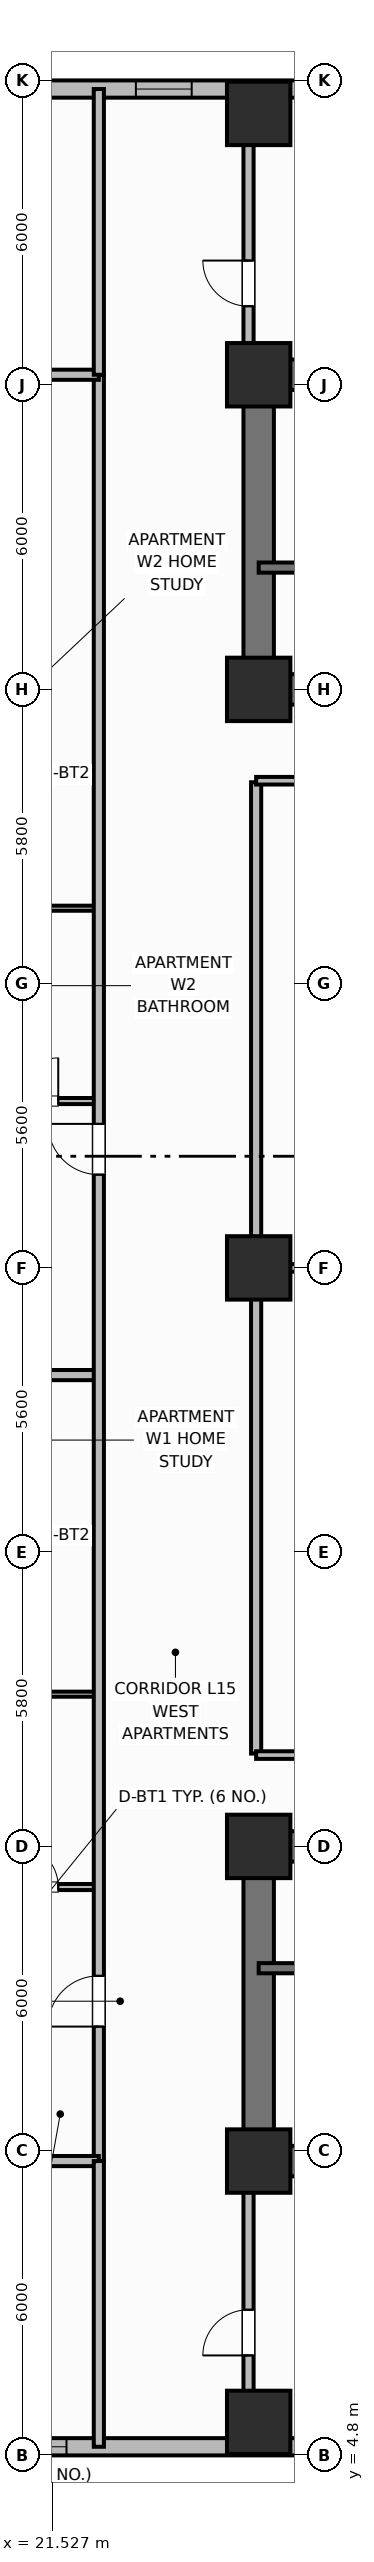
"""IFC4 building model, lengths in metres.
Left out: names, types, materials, properties, quantities, classifications, styles, units other than length and angle.
Written with IfcOpenShell. Run it as: python <this file> out.ifc"""

import sys

from ifc_helpers import new_model, si_unit, direction, frame, frame_2d, origin, origin_2d, place, context, subcontext, project, spatial, rectangle, extrude, element, fill, save


model = new_model("IFC4")
c1 = context("Model", 3, precision=1e-05, world=origin(), true_north=direction((0.0, 1.0)))
c2 = subcontext(c1, "Body", "Model", "MODEL_VIEW")
j1 = project(units=[si_unit("LENGTHUNIT", "METRE"), si_unit("PLANEANGLEUNIT", "RADIAN")], contexts=[c1])
p1 = place(None, origin())
s1 = spatial("IfcSite", under=j1, at=p1, CompositionType="ELEMENT")
p2 = place(p1, origin())
s2 = spatial("IfcBuilding", under=s1, at=p2, CompositionType="ELEMENT")
p3 = place(p2, frame((0.0, 0.0, 62.1)))
s3 = spatial("IfcBuildingStorey", under=s2, at=p3, CompositionType="ELEMENT", Elevation=62.1)
p4 = place(p3, frame((52.8, 10.6, 0.0), z_axis=(0.0, 0.0, 1.0), x_axis=(-1.0, 0.0, 0.0)))
e1 = element("IfcWall", 1, at=p4, inside=s3, PredefinedType="SHEAR", context=c2, shape_type="SweptSolid", body=[
    extrude(rectangle(XDim=27.2, YDim=0.6, at=frame_2d((13.6, 0.0))), origin(), (0.0, 0.0, 1.0), 3.7),
])
p5 = place(p3, frame((25.6, 10.9, 0.0), z_axis=(0.0, 0.0, 1.0), x_axis=(0.0, 1.0, 0.0)))
e2 = element("IfcWall", 2, at=p5, inside=s3, PredefinedType="SHEAR", context=c2, shape_type="SweptSolid", body=[
    extrude(rectangle(XDim=5.6, YDim=0.6, at=frame_2d((2.8, 0.0))), origin(), (0.0, 0.0, 1.0), 3.7),
])
p6 = place(p3, frame((25.6, 16.8, 0.0), z_axis=(0.0, 0.0, 1.0), x_axis=(1.0, 0.0, 0.0)))
e3 = element("IfcWall", 3, at=p6, inside=s3, PredefinedType="SHEAR", context=c2, shape_type="SweptSolid", body=[
    extrude(rectangle(XDim=27.2, YDim=0.6, at=frame_2d((13.6, 0.0))), origin(), (0.0, 0.0, 1.0), 3.7),
])
p7 = place(p6, frame((1.9, 0.0, 0.0)))
e4 = element("IfcOpeningElement", 4, at=p7, cuts=e3, PredefinedType="OPENING", context=c2, shape_type="SweptSolid", body=[
    extrude(rectangle(XDim=1.1, YDim=2.15, at=frame_2d((0.55, 1.075))), frame((0.0, 0.31, 0.0), z_axis=(0.0, -1.0, 0.0), x_axis=(1.0, 0.0, 0.0)), (0.0, 0.0, 1.0), 0.62),
])
p8 = place(p6, frame((13.0, 0.0, 0.0)))
e5 = element("IfcOpeningElement", 5, at=p8, cuts=e3, PredefinedType="OPENING", context=c2, shape_type="SweptSolid", body=[
    extrude(rectangle(XDim=1.2, YDim=2.15, at=frame_2d((0.6, 1.075))), frame((0.0, 0.31, 0.0), z_axis=(0.0, -1.0, 0.0), x_axis=(1.0, 0.0, 0.0)), (0.0, 0.0, 1.0), 0.62),
])
p9 = place(p6, frame((20.4, 0.0, 0.0)))
e6 = element("IfcOpeningElement", 6, at=p9, cuts=e3, PredefinedType="OPENING", context=c2, shape_type="SweptSolid", body=[
    extrude(rectangle(XDim=1.3, YDim=2.2, at=frame_2d((0.65, 1.1))), frame((0.0, 0.31, 0.0), z_axis=(0.0, -1.0, 0.0), x_axis=(1.0, 0.0, 0.0)), (0.0, 0.0, 1.0), 0.62),
])
p10 = place(p6, frame((24.65, 0.0, 0.0)))
e7 = element("IfcOpeningElement", 7, at=p10, cuts=e3, PredefinedType="OPENING", context=c2, shape_type="SweptSolid", body=[
    extrude(rectangle(XDim=0.85, YDim=2.1, at=frame_2d((0.425, 1.05))), frame((0.0, 0.31, 0.0), z_axis=(0.0, -1.0, 0.0), x_axis=(1.0, 0.0, 0.0)), (0.0, 0.0, 1.0), 0.62),
])
p11 = place(p3, frame((25.6, 45.8, 0.0), z_axis=(0.0, 0.0, 1.0), x_axis=(1.0, 0.0, 0.0)))
e8 = element("IfcWall", 8, at=p11, inside=s3, PredefinedType="SHEAR", context=c2, shape_type="SweptSolid", body=[
    extrude(rectangle(XDim=27.2, YDim=0.6, at=frame_2d((13.6, 0.0))), origin(), (0.0, 0.0, 1.0), 3.7),
])
p12 = place(p3, frame((25.6, 39.9, 0.0), z_axis=(0.0, 0.0, 1.0), x_axis=(0.0, 1.0, 0.0)))
e9 = element("IfcWall", 9, at=p12, inside=s3, PredefinedType="SHEAR", context=c2, shape_type="SweptSolid", body=[
    extrude(rectangle(XDim=5.6, YDim=0.6, at=frame_2d((2.8, 0.0))), origin(), (0.0, 0.0, 1.0), 3.7),
])
p13 = place(p3, frame((52.8, 39.6, 0.0), z_axis=(0.0, 0.0, 1.0), x_axis=(-1.0, 0.0, 0.0)))
e10 = element("IfcWall", 10, at=p13, inside=s3, PredefinedType="SHEAR", context=c2, shape_type="SweptSolid", body=[
    extrude(rectangle(XDim=27.2, YDim=0.6, at=frame_2d((13.6, 0.0))), origin(), (0.0, 0.0, 1.0), 3.7),
])
p14 = place(p13, frame((24.2, 0.0, 0.0)))
e11 = element("IfcOpeningElement", 11, at=p14, cuts=e10, PredefinedType="OPENING", context=c2, shape_type="SweptSolid", body=[
    extrude(rectangle(XDim=1.1, YDim=2.15, at=frame_2d((0.55, 1.075))), frame((0.0, 0.31, 0.0), z_axis=(0.0, -1.0, 0.0), x_axis=(1.0, 0.0, 0.0)), (0.0, 0.0, 1.0), 0.62),
])
p15 = place(p13, frame((15.1, 0.0, 0.0)))
e12 = element("IfcOpeningElement", 12, at=p15, cuts=e10, PredefinedType="OPENING", context=c2, shape_type="SweptSolid", body=[
    extrude(rectangle(XDim=1.2, YDim=2.15, at=frame_2d((0.6, 1.075))), frame((0.0, 0.31, 0.0), z_axis=(0.0, -1.0, 0.0), x_axis=(1.0, 0.0, 0.0)), (0.0, 0.0, 1.0), 0.62),
])
p16 = place(p13, frame((11.6, 0.0, 0.0)))
e13 = element("IfcOpeningElement", 13, at=p16, cuts=e10, PredefinedType="OPENING", context=c2, shape_type="SweptSolid", body=[
    extrude(rectangle(XDim=0.9, YDim=2.1, at=frame_2d((0.45, 1.05))), frame((0.0, 0.31, 0.0), z_axis=(0.0, -1.0, 0.0), x_axis=(1.0, 0.0, 0.0)), (0.0, 0.0, 1.0), 0.62),
])
p17 = place(p13, frame((3.6, 0.0, 0.0)))
e14 = element("IfcOpeningElement", 14, at=p17, cuts=e10, PredefinedType="OPENING", context=c2, shape_type="SweptSolid", body=[
    extrude(rectangle(XDim=1.0, YDim=2.15, at=frame_2d((0.5, 1.075))), frame((0.0, 0.31, 0.0), z_axis=(0.0, -1.0, 0.0), x_axis=(1.0, 0.0, 0.0)), (0.0, 0.0, 1.0), 0.62),
])
for number, where, z_axis, x_axis in (
    (15, (25.6, 10.6, 0.0), (0.0, 0.0, 1.0), (1.0, 0.0, 0.0)),
    (16, (25.6, 16.8, 0.0), (0.0, 0.0, 1.0), (1.0, 0.0, 0.0)),
    (17, (25.6, 39.6, 0.0), (0.0, 0.0, 1.0), (1.0, 0.0, 0.0)),
    (18, (25.6, 45.8, 0.0), (0.0, 0.0, 1.0), (1.0, 0.0, 0.0)),
    (19, (25.6, 28.2, 0.0), (0.0, 0.0, 1.0), (1.0, 0.0, 0.0)),
    (20, (25.6, 5.45, 0.0), (0.0, 0.0, 1.0), (1.0, 0.0, 0.0)),
    (21, (25.6, 50.95, 0.0), (0.0, 0.0, 1.0), (1.0, 0.0, 0.0)),
):
    element("IfcColumn", number, at=place(p3, frame(where, z_axis=z_axis, x_axis=x_axis)), inside=s3, PredefinedType="COLUMN", context=c2, shape_type="SweptSolid", body=[
        extrude(rectangle(XDim=1.25, YDim=1.25, at=origin_2d()), origin(), (0.0, 0.0, 1.0), 3.7),
    ])
p18 = place(p3, frame((18.6, 4.97, 0.0), z_axis=(0.0, 0.0, 1.0), x_axis=(1.0, 0.0, 0.0)))
e22 = element("IfcWall", 22, at=p18, inside=s3, PredefinedType="SOLIDWALL", context=c2, shape_type="SweptSolid", body=[
    extrude(rectangle(XDim=17.4, YDim=0.34, at=frame_2d((8.7, 0.0))), origin(), (0.0, 0.0, 1.0), 2.7),
])
p19 = place(p18, frame((1.413, 0.0, 0.73)))
e23 = element("IfcOpeningElement", 23, at=p19, cuts=e22, PredefinedType="OPENING", context=c2, shape_type="SweptSolid", body=[
    extrude(rectangle(XDim=1.8, YDim=1.85, at=frame_2d((0.9, 0.925))), frame((0.0, 0.18, 0.0), z_axis=(0.0, -1.0, 0.0), x_axis=(1.0, 0.0, 0.0)), (0.0, 0.0, 1.0), 0.36),
])
p20 = place(p18, frame((9.812, 0.0, 0.73)))
e24 = element("IfcOpeningElement", 24, at=p20, cuts=e22, PredefinedType="OPENING", context=c2, shape_type="SweptSolid", body=[
    extrude(rectangle(XDim=1.8, YDim=1.85, at=frame_2d((0.9, 0.925))), frame((0.0, 0.18, 0.0), z_axis=(0.0, -1.0, 0.0), x_axis=(1.0, 0.0, 0.0)), (0.0, 0.0, 1.0), 0.36),
])
p21 = place(p18, frame((13.488, 0.0, 0.73)))
e25 = element("IfcOpeningElement", 25, at=p21, cuts=e22, PredefinedType="OPENING", context=c2, shape_type="SweptSolid", body=[
    extrude(rectangle(XDim=1.8, YDim=1.85, at=frame_2d((0.9, 0.925))), frame((0.0, 0.18, 0.0), z_axis=(0.0, -1.0, 0.0), x_axis=(1.0, 0.0, 0.0)), (0.0, 0.0, 1.0), 0.36),
])
p22 = place(p3, frame((36.0, 51.43, 0.0), z_axis=(0.0, 0.0, 1.0), x_axis=(-1.0, 0.0, 0.0)))
e26 = element("IfcWall", 26, at=p22, inside=s3, PredefinedType="SOLIDWALL", context=c2, shape_type="SweptSolid", body=[
    extrude(rectangle(XDim=17.4, YDim=0.34, at=frame_2d((8.7, 0.0))), origin(), (0.0, 0.0, 1.0), 2.7),
])
p23 = place(p22, frame((2.06, 0.0, 0.93)))
e27 = element("IfcOpeningElement", 27, at=p23, cuts=e26, PredefinedType="OPENING", context=c2, shape_type="SweptSolid", body=[
    extrude(rectangle(XDim=1.1, YDim=1.65, at=frame_2d((0.55, 0.825))), frame((0.0, 0.18, 0.0), z_axis=(0.0, -1.0, 0.0), x_axis=(1.0, 0.0, 0.0)), (0.0, 0.0, 1.0), 0.36),
])
p24 = place(p22, frame((4.93, 0.0, 0.93)))
e28 = element("IfcOpeningElement", 28, at=p24, cuts=e26, PredefinedType="OPENING", context=c2, shape_type="SweptSolid", body=[
    extrude(rectangle(XDim=1.1, YDim=1.65, at=frame_2d((0.55, 0.825))), frame((0.0, 0.18, 0.0), z_axis=(0.0, -1.0, 0.0), x_axis=(1.0, 0.0, 0.0)), (0.0, 0.0, 1.0), 0.36),
])
p25 = place(p22, frame((7.8, 0.0, 0.93)))
e29 = element("IfcOpeningElement", 29, at=p25, cuts=e26, PredefinedType="OPENING", context=c2, shape_type="SweptSolid", body=[
    extrude(rectangle(XDim=1.1, YDim=1.65, at=frame_2d((0.55, 0.825))), frame((0.0, 0.18, 0.0), z_axis=(0.0, -1.0, 0.0), x_axis=(1.0, 0.0, 0.0)), (0.0, 0.0, 1.0), 0.36),
])
p26 = place(p22, frame((11.72, 0.0, 0.93)))
e30 = element("IfcOpeningElement", 30, at=p26, cuts=e26, PredefinedType="OPENING", context=c2, shape_type="SweptSolid", body=[
    extrude(rectangle(XDim=1.1, YDim=1.65, at=frame_2d((0.55, 0.825))), frame((0.0, 0.18, 0.0), z_axis=(0.0, -1.0, 0.0), x_axis=(1.0, 0.0, 0.0)), (0.0, 0.0, 1.0), 0.36),
])
p27 = place(p22, frame((14.59, 0.0, 0.93)))
e31 = element("IfcOpeningElement", 31, at=p27, cuts=e26, PredefinedType="OPENING", context=c2, shape_type="SweptSolid", body=[
    extrude(rectangle(XDim=1.1, YDim=1.65, at=frame_2d((0.55, 0.825))), frame((0.0, 0.18, 0.0), z_axis=(0.0, -1.0, 0.0), x_axis=(1.0, 0.0, 0.0)), (0.0, 0.0, 1.0), 0.36),
])
p28 = place(p3, frame((25.6, 14.4, 0.0), z_axis=(0.0, 0.0, 1.0), x_axis=(1.0, 0.0, 0.0)))
e32 = element("IfcWall", 32, at=p28, inside=s3, PredefinedType="SHEAR", context=c2, shape_type="SweptSolid", body=[
    extrude(rectangle(XDim=9.55, YDim=0.2, at=frame_2d((4.775, 0.0))), origin(), (0.0, 0.0, 1.0), 3.7),
])
p29 = place(p28, frame((1.05, 0.0, 0.0)))
e33 = element("IfcOpeningElement", 33, at=p29, cuts=e32, PredefinedType="OPENING", context=c2, shape_type="SweptSolid", body=[
    extrude(rectangle(XDim=1.1, YDim=2.15, at=frame_2d((0.55, 1.075))), frame((0.0, 0.11, 0.0), z_axis=(0.0, -1.0, 0.0), x_axis=(1.0, 0.0, 0.0)), (0.0, 0.0, 1.0), 0.22),
])
p30 = place(p3, frame((35.15, 42.0, 0.0), z_axis=(0.0, 0.0, 1.0), x_axis=(-1.0, 0.0, 0.0)))
e34 = element("IfcWall", 34, at=p30, inside=s3, PredefinedType="SHEAR", context=c2, shape_type="SweptSolid", body=[
    extrude(rectangle(XDim=9.55, YDim=0.2, at=frame_2d((4.775, 0.0))), origin(), (0.0, 0.0, 1.0), 3.7),
])
p31 = place(p30, frame((7.25, 0.0, 0.0)))
e35 = element("IfcOpeningElement", 35, at=p31, cuts=e34, PredefinedType="OPENING", context=c2, shape_type="SweptSolid", body=[
    extrude(rectangle(XDim=1.1, YDim=2.15, at=frame_2d((0.55, 1.075))), frame((0.0, 0.11, 0.0), z_axis=(0.0, -1.0, 0.0), x_axis=(1.0, 0.0, 0.0)), (0.0, 0.0, 1.0), 0.22),
])
p32 = place(p3, frame((25.55, 18.63, 0.0), z_axis=(0.0, 0.0, 1.0), x_axis=(0.0, 1.0, 0.0)))
e36 = element("IfcWall", 36, at=p32, inside=s3, PredefinedType="PARTITIONING", context=c2, shape_type="SweptSolid", body=[
    extrude(rectangle(XDim=19.14, YDim=0.2, at=frame_2d((9.57, 0.0))), origin(), (0.0, 0.0, 1.0), 2.53),
])
for number, where, z_axis, x_axis in (
    (37, (25.55, 18.6, 0.0), (0.0, 0.0, 1.0), (1.0, 0.0, 0.0)),
    (38, (25.55, 37.8, 0.0), (0.0, 0.0, 1.0), (1.0, 0.0, 0.0)),
):
    element("IfcWall", number, at=place(p3, frame(where, z_axis=z_axis, x_axis=x_axis)), inside=s3, PredefinedType="PARTITIONING", context=c2, shape_type="SweptSolid", body=[
        extrude(rectangle(XDim=14.9, YDim=0.15, at=frame_2d((7.45, 0.0))), origin(), (0.0, 0.0, 1.0), 2.53),
    ])
p33 = place(p3, frame((25.6, 28.2, 0.0), z_axis=(0.0, 0.0, 1.0), x_axis=(1.0, 0.0, 0.0)))
e39 = element("IfcWall", 39, at=p33, inside=s3, PredefinedType="PARTITIONING", context=c2, shape_type="SweptSolid", body=[
    extrude(rectangle(XDim=14.87, YDim=0.15, at=frame_2d((7.435, 0.0))), origin(), (0.0, 0.0, 1.0), 2.53),
])
p34 = place(p3, frame((20.2, 16.0, 0.0), z_axis=(0.0, 0.0, 1.0), x_axis=(1.0, 0.0, 0.0)))
e40 = element("IfcWall", 40, at=p34, inside=s3, PredefinedType="PARTITIONING", context=c2, shape_type="SweptSolid", body=[
    extrude(rectangle(XDim=2.25, YDim=0.12, at=frame_2d((1.125, 0.0))), origin(), (0.0, 0.0, 1.0), 2.53),
])
p35 = place(p34, frame((0.6, 0.0, 0.0)))
e41 = element("IfcOpeningElement", 41, at=p35, cuts=e40, PredefinedType="OPENING", context=c2, shape_type="SweptSolid", body=[
    extrude(rectangle(XDim=0.85, YDim=2.1, at=frame_2d((0.425, 1.05))), frame((0.0, 0.07, 0.0), z_axis=(0.0, -1.0, 0.0), x_axis=(1.0, 0.0, 0.0)), (0.0, 0.0, 1.0), 0.14),
])
p36 = place(p3, frame((20.2, 19.8, 0.0), z_axis=(0.0, 0.0, 1.0), x_axis=(1.0, 0.0, 0.0)))
e42 = element("IfcWall", 42, at=p36, inside=s3, PredefinedType="PARTITIONING", context=c2, shape_type="SweptSolid", body=[
    extrude(rectangle(XDim=2.25, YDim=0.1, at=frame_2d((1.125, 0.0))), origin(), (0.0, 0.0, 1.0), 2.53),
])
p37 = place(p3, frame((15.226, 26.088, 0.0), z_axis=(0.0, 0.0, 1.0), x_axis=(1.0, 0.0, 0.0)))
e43 = element("IfcWall", 43, at=p37, inside=s3, PredefinedType="PARTITIONING", context=c2, shape_type="SweptSolid", body=[
    extrude(rectangle(XDim=7.224, YDim=0.2, at=frame_2d((3.612, 0.0))), origin(), (0.0, 0.0, 1.0), 2.53),
])
p38 = place(p3, frame((20.2, 31.488, 0.0), z_axis=(0.0, 0.0, 1.0), x_axis=(1.0, 0.0, 0.0)))
e44 = element("IfcWall", 44, at=p38, inside=s3, PredefinedType="PARTITIONING", context=c2, shape_type="SweptSolid", body=[
    extrude(rectangle(XDim=2.25, YDim=0.12, at=frame_2d((1.125, 0.0))), origin(), (0.0, 0.0, 1.0), 2.53),
])
p39 = place(p38, frame((0.6, 0.0, 0.0)))
e45 = element("IfcOpeningElement", 45, at=p39, cuts=e44, PredefinedType="OPENING", context=c2, shape_type="SweptSolid", body=[
    extrude(rectangle(XDim=0.85, YDim=2.1, at=frame_2d((0.425, 1.05))), frame((0.0, 0.07, 0.0), z_axis=(0.0, -1.0, 0.0), x_axis=(1.0, 0.0, 0.0)), (0.0, 0.0, 1.0), 0.14),
])
p40 = place(p3, frame((20.2, 35.288, 0.0), z_axis=(0.0, 0.0, 1.0), x_axis=(1.0, 0.0, 0.0)))
e46 = element("IfcWall", 46, at=p40, inside=s3, PredefinedType="PARTITIONING", context=c2, shape_type="SweptSolid", body=[
    extrude(rectangle(XDim=2.25, YDim=0.1, at=frame_2d((1.125, 0.0))), origin(), (0.0, 0.0, 1.0), 2.53),
])
p41 = place(p3, frame((22.45, 10.6, 0.0), z_axis=(0.0, 0.0, 1.0), x_axis=(0.0, 1.0, 0.0)))
e47 = element("IfcWall", 47, at=p41, inside=s3, PredefinedType="PARTITIONING", context=c2, shape_type="SweptSolid", body=[
    extrude(rectangle(XDim=35.2, YDim=0.2, at=frame_2d((17.6, 0.0))), origin(), (0.0, 0.0, 1.0), 2.53),
])
p42 = place(p41, frame((2.65, 0.0, 0.0)))
e48 = element("IfcOpeningElement", 48, at=p42, cuts=e47, PredefinedType="OPENING", context=c2, shape_type="SweptSolid", body=[
    extrude(rectangle(XDim=1.0, YDim=2.15, at=frame_2d((0.5, 1.075))), frame((0.0, 0.11, 0.0), z_axis=(0.0, -1.0, 0.0), x_axis=(1.0, 0.0, 0.0)), (0.0, 0.0, 1.0), 0.22),
])
p43 = place(p41, frame((19.438, 0.0, 0.0)))
e49 = element("IfcOpeningElement", 49, at=p43, cuts=e47, PredefinedType="OPENING", context=c2, shape_type="SweptSolid", body=[
    extrude(rectangle(XDim=1.0, YDim=2.15, at=frame_2d((0.5, 1.075))), frame((0.0, 0.11, 0.0), z_axis=(0.0, -1.0, 0.0), x_axis=(1.0, 0.0, 0.0)), (0.0, 0.0, 1.0), 0.22),
])
for number, where, z_axis, x_axis in (
    (50, (14.99, 10.6, 0.0), (0.0, 0.0, 1.0), (1.0, 0.0, 0.0)),
    (51, (14.99, 45.8, 0.0), (0.0, 0.0, 1.0), (1.0, 0.0, 0.0)),
):
    element("IfcWall", number, at=place(p3, frame(where, z_axis=z_axis, x_axis=x_axis)), inside=s3, PredefinedType="PARTITIONING", context=c2, shape_type="SweptSolid", body=[
        extrude(rectangle(XDim=7.46, YDim=0.2, at=frame_2d((3.73, 0.0))), origin(), (0.0, 0.0, 1.0), 2.53),
    ])
p44 = place(p3, frame((22.45, 4.97, 0.0), z_axis=(0.0, 0.0, 1.0), x_axis=(0.0, 1.0, 0.0)))
e52 = element("IfcWall", 52, at=p44, inside=s3, PredefinedType="PARTITIONING", context=c2, shape_type="SweptSolid", body=[
    extrude(rectangle(XDim=5.63, YDim=0.2, at=frame_2d((2.815, 0.0))), origin(), (0.0, 0.0, 1.0), 2.53),
])
p45 = place(p3, frame((22.45, 45.8, 0.0), z_axis=(0.0, 0.0, 1.0), x_axis=(0.0, 1.0, 0.0)))
e53 = element("IfcWall", 53, at=p45, inside=s3, PredefinedType="PARTITIONING", context=c2, shape_type="SweptSolid", body=[
    extrude(rectangle(XDim=5.63, YDim=0.2, at=frame_2d((2.815, 0.0))), origin(), (0.0, 0.0, 1.0), 2.53),
])
p46 = place(p3, frame((25.4, 5.72, 0.0), z_axis=(0.0, 0.0, 1.0), x_axis=(0.0, 1.0, 0.0)))
e54 = element("IfcWall", 54, at=p46, inside=s3, PredefinedType="PARTITIONING", context=c2, shape_type="SweptSolid", body=[
    extrude(rectangle(XDim=4.58, YDim=0.2, at=frame_2d((2.29, 0.0))), origin(), (0.0, 0.0, 1.0), 2.53),
])
p47 = place(p46, frame((1.05, 0.0, 0.0)))
e55 = element("IfcOpeningElement", 55, at=p47, cuts=e54, PredefinedType="OPENING", context=c2, shape_type="SweptSolid", body=[
    extrude(rectangle(XDim=0.9, YDim=2.1, at=frame_2d((0.45, 1.05))), frame((0.0, 0.11, 0.0), z_axis=(0.0, -1.0, 0.0), x_axis=(1.0, 0.0, 0.0)), (0.0, 0.0, 1.0), 0.22),
])
p48 = place(p3, frame((25.4, 46.1, 0.0), z_axis=(0.0, 0.0, 1.0), x_axis=(0.0, 1.0, 0.0)))
e56 = element("IfcWall", 56, at=p48, inside=s3, PredefinedType="PARTITIONING", context=c2, shape_type="SweptSolid", body=[
    extrude(rectangle(XDim=4.58, YDim=0.2, at=frame_2d((2.29, 0.0))), origin(), (0.0, 0.0, 1.0), 2.53),
])
p49 = place(p48, frame((1.05, 0.0, 0.0)))
e57 = element("IfcOpeningElement", 57, at=p49, cuts=e56, PredefinedType="OPENING", context=c2, shape_type="SweptSolid", body=[
    extrude(rectangle(XDim=0.9, YDim=2.1, at=frame_2d((0.45, 1.05))), frame((0.0, 0.11, 0.0), z_axis=(0.0, -1.0, 0.0), x_axis=(1.0, 0.0, 0.0)), (0.0, 0.0, 1.0), 0.22),
])
p50 = place(p19, origin())
e58 = element("IfcWindow", 58, at=p50, inside=s3, PartitioningType="SINGLE_PANEL", PredefinedType="WINDOW", context=c2, shape_type="SweptSolid", body=[
    extrude(rectangle(XDim=1.8, YDim=1.85, at=frame_2d((0.9, 0.925))), frame((0.0, 0.03, 0.0), z_axis=(0.0, -1.0, 0.0), x_axis=(1.0, 0.0, 0.0)), (0.0, 0.0, 1.0), 0.06),
])
fill(e23, e58)
p51 = place(p26, origin())
e59 = element("IfcWindow", 59, at=p51, inside=s3, PartitioningType="SINGLE_PANEL", PredefinedType="WINDOW", context=c2, shape_type="SweptSolid", body=[
    extrude(rectangle(XDim=1.1, YDim=1.65, at=frame_2d((0.55, 0.825))), frame((0.0, 0.03, 0.0), z_axis=(0.0, -1.0, 0.0), x_axis=(1.0, 0.0, 0.0)), (0.0, 0.0, 1.0), 0.06),
])
fill(e30, e59)
p52 = place(p35, origin())
e60 = element("IfcDoor", 60, at=p52, inside=s3, OperationType="SINGLE_SWING_LEFT", PredefinedType="DOOR", context=c2, shape_type="SweptSolid", body=[
    extrude(rectangle(XDim=0.85, YDim=2.1, at=frame_2d((0.425, 1.05))), frame((0.0, 0.025, 0.0), z_axis=(0.0, -1.0, 0.0), x_axis=(1.0, 0.0, 0.0)), (0.0, 0.0, 1.0), 0.05),
])
fill(e41, e60)
p53 = place(p39, origin())
e61 = element("IfcDoor", 61, at=p53, inside=s3, OperationType="SINGLE_SWING_RIGHT", PredefinedType="DOOR", context=c2, shape_type="SweptSolid", body=[
    extrude(rectangle(XDim=0.85, YDim=2.1, at=frame_2d((0.425, 1.05))), frame((0.0, 0.025, 0.0), z_axis=(0.0, -1.0, 0.0), x_axis=(1.0, 0.0, 0.0)), (0.0, 0.0, 1.0), 0.05),
])
fill(e45, e61)
p54 = place(p42, origin())
e62 = element("IfcDoor", 62, at=p54, inside=s3, OperationType="SINGLE_SWING_LEFT", PredefinedType="DOOR", context=c2, shape_type="SweptSolid", body=[
    extrude(rectangle(XDim=1.0, YDim=2.15, at=frame_2d((0.5, 1.075))), frame((0.0, 0.025, 0.0), z_axis=(0.0, -1.0, 0.0), x_axis=(1.0, 0.0, 0.0)), (0.0, 0.0, 1.0), 0.05),
])
fill(e48, e62)
p55 = place(p43, origin())
e63 = element("IfcDoor", 63, at=p55, inside=s3, OperationType="SINGLE_SWING_RIGHT", PredefinedType="DOOR", context=c2, shape_type="SweptSolid", body=[
    extrude(rectangle(XDim=1.0, YDim=2.15, at=frame_2d((0.5, 1.075))), frame((0.0, 0.025, 0.0), z_axis=(0.0, -1.0, 0.0), x_axis=(1.0, 0.0, 0.0)), (0.0, 0.0, 1.0), 0.05),
])
fill(e49, e63)
p56 = place(p47, origin())
e64 = element("IfcDoor", 64, at=p56, inside=s3, OperationType="SINGLE_SWING_LEFT", PredefinedType="DOOR", context=c2, shape_type="SweptSolid", body=[
    extrude(rectangle(XDim=0.9, YDim=2.1, at=frame_2d((0.45, 1.05))), frame((0.0, 0.025, 0.0), z_axis=(0.0, -1.0, 0.0), x_axis=(1.0, 0.0, 0.0)), (0.0, 0.0, 1.0), 0.05),
])
fill(e55, e64)
p57 = place(p49, origin())
e65 = element("IfcDoor", 65, at=p57, inside=s3, OperationType="SINGLE_SWING_RIGHT", PredefinedType="DOOR", context=c2, shape_type="SweptSolid", body=[
    extrude(rectangle(XDim=0.9, YDim=2.1, at=frame_2d((0.45, 1.05))), frame((0.0, 0.025, 0.0), z_axis=(0.0, -1.0, 0.0), x_axis=(1.0, 0.0, 0.0)), (0.0, 0.0, 1.0), 0.05),
])
fill(e57, e65)
save(model, sys.argv[1])
